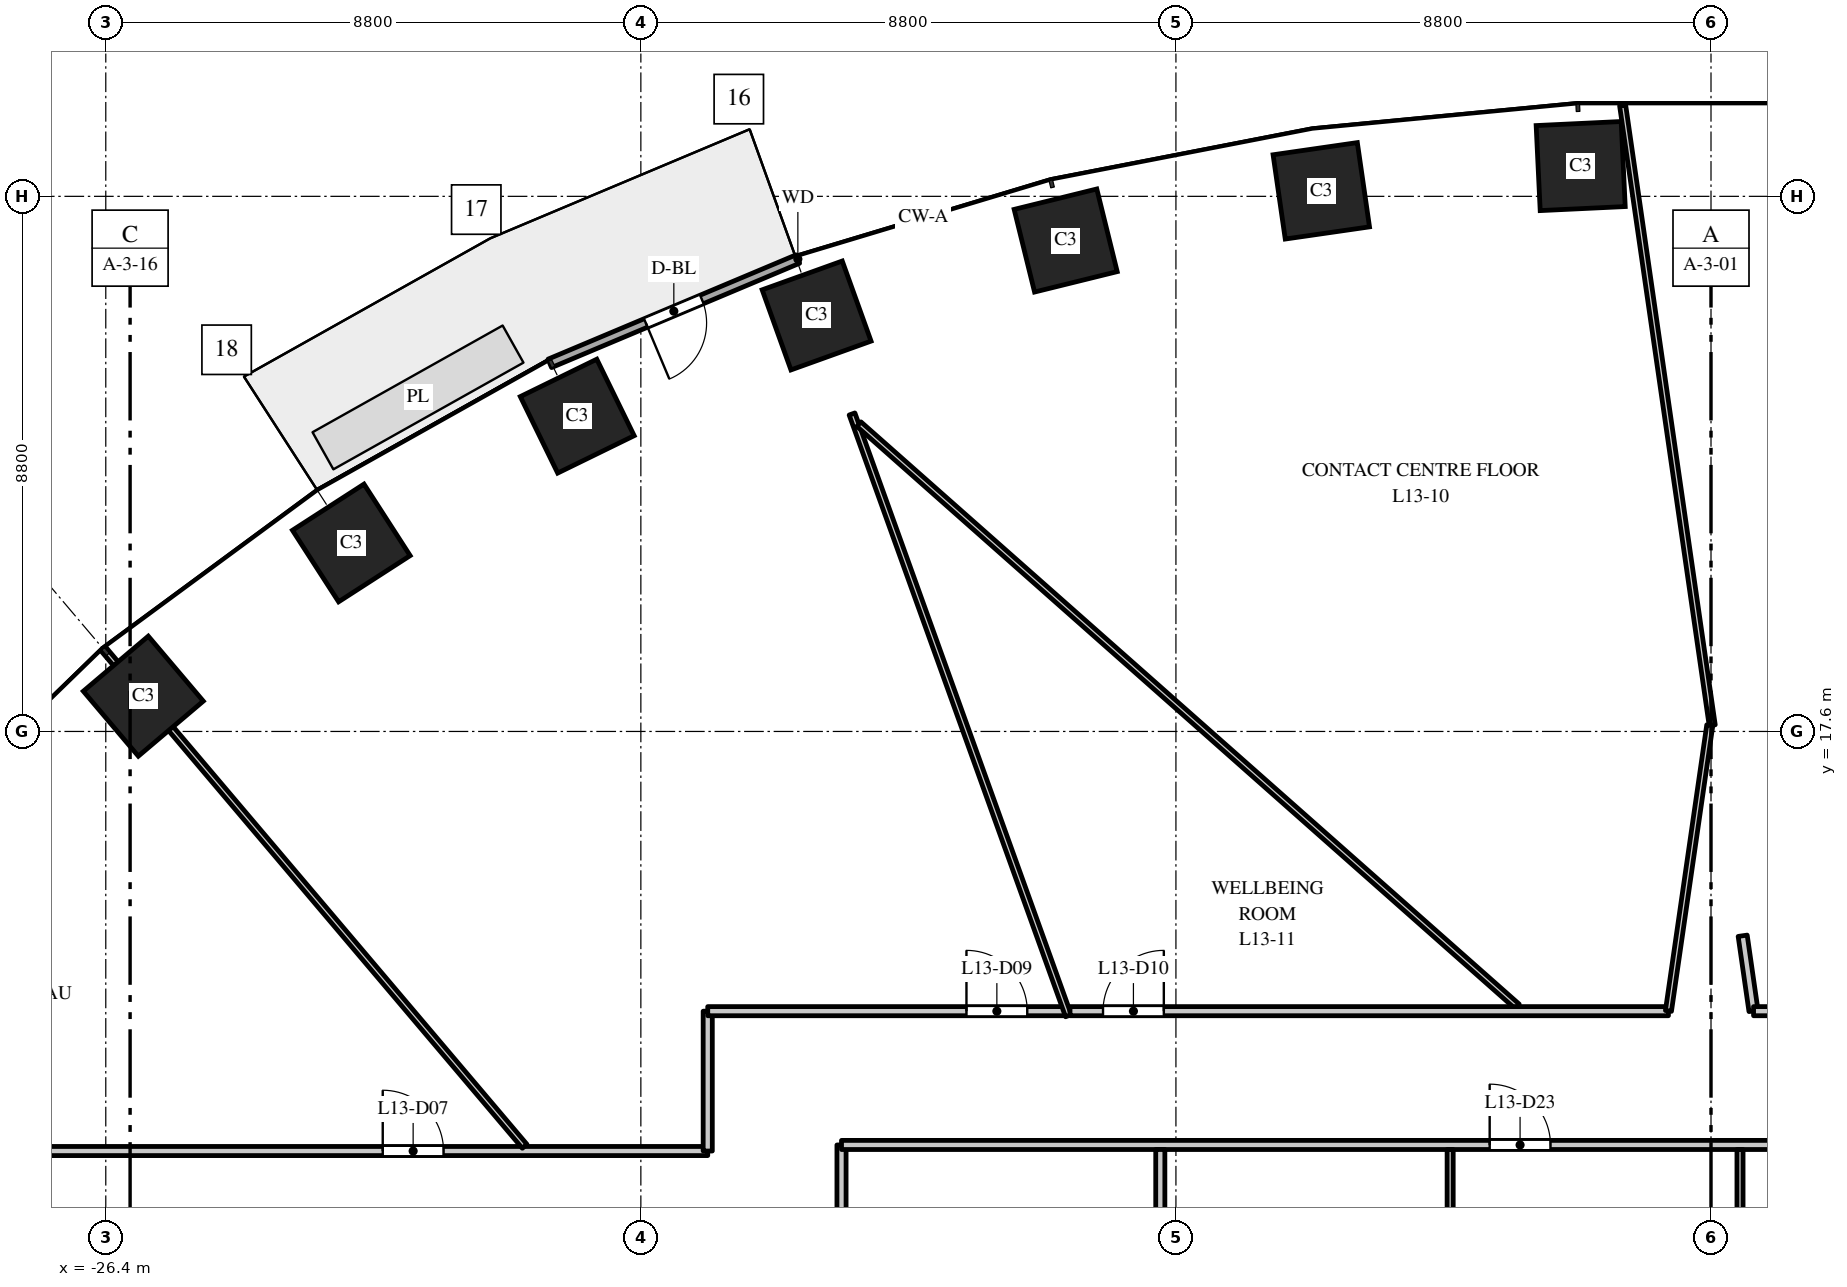
"""IFC4 building model, lengths in metres.
Left out: names, types, materials, properties, quantities, classifications, styles, units other than length and angle.
Written with IfcOpenShell. Run it as: python <this file> out.ifc"""

import sys

from ifc_helpers import new_model, si_unit, direction, frame, frame_2d, origin, origin_2d, place, context, subcontext, project, spatial, rectangle, extrude, element, fill, save


model = new_model("IFC4")
c1 = context("Model", 3, precision=1e-05, world=origin(), true_north=direction((0.0, 1.0)))
c2 = subcontext(c1, "Body", "Model", "MODEL_VIEW")
j1 = project(units=[si_unit("LENGTHUNIT", "METRE"), si_unit("PLANEANGLEUNIT", "RADIAN")], contexts=[c1])
p1 = place(None, origin())
s1 = spatial("IfcSite", under=j1, at=p1, CompositionType="ELEMENT")
p2 = place(p1, origin())
s2 = spatial("IfcBuilding", under=s1, at=p2, CompositionType="ELEMENT")
p3 = place(p2, frame((0.0, 0.0, 62.5)))
s3 = spatial("IfcBuildingStorey", under=s2, at=p3, CompositionType="ELEMENT", Elevation=62.5)
for number, where, z_axis, x_axis in (
    (1, (-2.143, 26.898, 0.0), (0.0, 0.0, 1.0), (-0.999, -0.048, 0.0)),
    (2, (-6.409, 26.491, 0.0), (0.0, 0.0, 1.0), (-0.99, -0.143, 0.0)),
    (3, (-10.613, 25.674, 0.0), (0.0, 0.0, 1.0), (-0.971, -0.24, 0.0)),
    (4, (-14.709, 24.441, 0.0), (0.0, 0.0, 1.0), (-0.941, -0.338, 0.0)),
    (5, (-18.646, 22.785, 0.0), (0.0, 0.0, 1.0), (-0.898, -0.439, 0.0)),
    (6, (-22.362, 20.7, 0.0), (0.0, 0.0, 1.0), (-0.84, -0.542, 0.0)),
    (7, (-25.783, 18.18, 0.0), (0.0, 0.0, 1.0), (-0.763, -0.646, 0.0)),
):
    element("IfcColumn", number, at=place(p3, frame(where, z_axis=z_axis, x_axis=x_axis)), inside=s3, PredefinedType="COLUMN", context=c2, shape_type="SweptSolid", body=[
        extrude(rectangle(XDim=1.4, YDim=1.4, at=origin_2d()), origin(), (0.0, 0.0, 1.0), 4.0),
    ])
p4 = place(p3, frame((-15.018, 25.369, 0.0), z_axis=(0.0, 0.0, 1.0), x_axis=(-0.921816985161, -0.387625393736, 0.0)))
e8 = element("IfcWall", 8, at=p4, inside=s3, PredefinedType="STANDARD", context=c2, shape_type="SweptSolid", body=[
    extrude(rectangle(XDim=4.426, YDim=0.15, at=frame_2d((2.213, 0.0))), origin(), (0.0, 0.0, 1.0), 3.7),
])
p5 = place(p4, frame((1.713, 0.0, 0.0)))
e9 = element("IfcOpeningElement", 9, at=p5, cuts=e8, PredefinedType="OPENING", context=c2, shape_type="SweptSolid", body=[
    extrude(rectangle(XDim=1.0, YDim=2.4, at=frame_2d((0.5, 1.2))), frame((0.0, 0.085, 0.0), z_axis=(0.0, -1.0, 0.0), x_axis=(1.0, 0.0, 0.0)), (0.0, 0.0, 1.0), 0.17),
])
p6 = place(p3, frame((-31.5, 10.7, 0.0), z_axis=(0.0, 0.0, 1.0), x_axis=(1.0, 0.0, 0.0)))
e10 = element("IfcWall", 10, at=p6, inside=s3, PredefinedType="PARTITIONING", context=c2, shape_type="SweptSolid", body=[
    extrude(rectangle(XDim=15.0, YDim=0.15, at=frame_2d((7.5, 0.0))), origin(), (0.0, 0.0, 1.0), 3.1),
])
p7 = place(p6, frame((9.655, 0.0, 0.0)))
e11 = element("IfcOpeningElement", 11, at=p7, cuts=e10, PredefinedType="OPENING", context=c2, shape_type="SweptSolid", body=[
    extrude(rectangle(XDim=1.0, YDim=2.1, at=frame_2d((0.5, 1.05))), frame((0.0, 0.085, 0.0), z_axis=(0.0, -1.0, 0.0), x_axis=(1.0, 0.0, 0.0)), (0.0, 0.0, 1.0), 0.17),
])
p8 = place(p3, frame((-26.43, 18.945, 0.0), z_axis=(0.0, 0.0, 1.0), x_axis=(0.646400187952, -0.762998556365, 0.0)))
e12 = element("IfcWall", 12, at=p8, inside=s3, PredefinedType="PARTITIONING", context=c2, shape_type="SweptSolid", body=[
    extrude(rectangle(XDim=10.704, YDim=0.1, at=frame_2d((5.352, 0.0))), origin(), (0.0, 0.0, 1.0), 3.7),
])
p9 = place(p3, frame((-16.5, 10.7, 0.0), z_axis=(0.0, 0.0, 1.0), x_axis=(0.0, 1.0, 0.0)))
e13 = element("IfcWall", 13, at=p9, inside=s3, PredefinedType="PARTITIONING", context=c2, shape_type="SweptSolid", body=[
    extrude(rectangle(XDim=2.3, YDim=0.15, at=frame_2d((1.15, 0.0))), origin(), (0.0, 0.0, 1.0), 2.75),
])
p10 = place(p3, frame((-16.5, 13.0, 0.0), z_axis=(0.0, 0.0, 1.0), x_axis=(1.0, 0.0, 0.0)))
e14 = element("IfcWall", 14, at=p10, inside=s3, PredefinedType="PARTITIONING", context=c2, shape_type="SweptSolid", body=[
    extrude(rectangle(XDim=5.893, YDim=0.15, at=frame_2d((2.947, 0.0))), origin(), (0.0, 0.0, 1.0), 2.85),
])
p11 = place(p10, frame((4.255, 0.0, 0.0)))
e15 = element("IfcOpeningElement", 15, at=p11, cuts=e14, PredefinedType="OPENING", context=c2, shape_type="SweptSolid", body=[
    extrude(rectangle(XDim=1.0, YDim=2.1, at=frame_2d((0.5, 1.05))), frame((0.0, 0.085, 0.0), z_axis=(0.0, -1.0, 0.0), x_axis=(1.0, 0.0, 0.0)), (0.0, 0.0, 1.0), 0.17),
])
p12 = place(p3, frame((-14.3, -10.8, 0.0), z_axis=(0.0, 0.0, 1.0), x_axis=(0.0, 1.0, 0.0)))
e16 = element("IfcWall", 16, at=p12, inside=s3, PredefinedType="PARTITIONING", context=c2, shape_type="SweptSolid", body=[
    extrude(rectangle(XDim=21.6, YDim=0.15, at=frame_2d((10.8, 0.0))), origin(), (0.0, 0.0, 1.0), 2.75),
])
p13 = place(p12, frame((0.65, 0.0, 0.0)))
e17 = element("IfcOpeningElement", 17, at=p13, cuts=e16, PredefinedType="OPENING", context=c2, shape_type="SweptSolid", body=[
    extrude(rectangle(XDim=1.0, YDim=2.1, at=frame_2d((0.5, 1.05))), frame((0.0, 0.085, 0.0), z_axis=(0.0, -1.0, 0.0), x_axis=(1.0, 0.0, 0.0)), (0.0, 0.0, 1.0), 0.17),
])
p14 = place(p3, frame((-14.3, 10.8, 0.0), z_axis=(0.0, 0.0, 1.0), x_axis=(1.0, 0.0, 0.0)))
e18 = element("IfcWall", 18, at=p14, inside=s3, PredefinedType="PARTITIONING", context=c2, shape_type="SweptSolid", body=[
    extrude(rectangle(XDim=28.6, YDim=0.15, at=frame_2d((14.3, 0.0))), origin(), (0.0, 0.0, 1.0), 2.85),
])
p15 = place(p14, frame((10.66, 0.0, 0.0)))
e19 = element("IfcOpeningElement", 19, at=p15, cuts=e18, PredefinedType="OPENING", context=c2, shape_type="SweptSolid", body=[
    extrude(rectangle(XDim=1.0, YDim=2.1, at=frame_2d((0.5, 1.05))), frame((0.0, 0.085, 0.0), z_axis=(0.0, -1.0, 0.0), x_axis=(1.0, 0.0, 0.0)), (0.0, 0.0, 1.0), 0.17),
])
p16 = place(p14, frame((15.427, 0.0, 0.0)))
e20 = element("IfcOpeningElement", 20, at=p16, cuts=e18, PredefinedType="OPENING", context=c2, shape_type="SweptSolid", body=[
    extrude(rectangle(XDim=1.0, YDim=2.1, at=frame_2d((0.5, 1.05))), frame((0.0, 0.085, 0.0), z_axis=(0.0, -1.0, 0.0), x_axis=(1.0, 0.0, 0.0)), (0.0, 0.0, 1.0), 0.17),
])
p17 = place(p14, frame((22.693, 0.0, 0.0)))
e21 = element("IfcOpeningElement", 21, at=p17, cuts=e18, PredefinedType="OPENING", context=c2, shape_type="SweptSolid", body=[
    extrude(rectangle(XDim=1.0, YDim=2.1, at=frame_2d((0.5, 1.05))), frame((0.0, 0.085, 0.0), z_axis=(0.0, -1.0, 0.0), x_axis=(1.0, 0.0, 0.0)), (0.0, 0.0, 1.0), 0.17),
])
p18 = place(p3, frame((-14.127, 22.821, 0.0), z_axis=(0.0, 0.0, 1.0), x_axis=(0.338406243201, -0.941000114008, 0.0)))
e22 = element("IfcWall", 22, at=p18, inside=s3, PredefinedType="PARTITIONING", context=c2, shape_type="SweptSolid", body=[
    extrude(rectangle(XDim=10.516, YDim=0.1, at=frame_2d((5.258, 0.0))), origin(), (0.0, 0.0, 1.0), 2.85),
])
p19 = place(p3, frame((-14.014, 22.654, 0.0), z_axis=(0.0, 0.0, 1.0), x_axis=(0.749047176019, -0.662516662506, 0.0)))
e23 = element("IfcWall", 23, at=p19, inside=s3, PredefinedType="PARTITIONING", context=c2, shape_type="SweptSolid", body=[
    extrude(rectangle(XDim=14.454, YDim=0.1, at=frame_2d((7.227, 0.0))), origin(), (0.0, 0.0, 1.0), 2.85),
])
p20 = place(p3, frame((-10.542, 13.0, 0.0), z_axis=(0.0, 0.0, 1.0), x_axis=(1.0, 0.0, 0.0)))
e24 = element("IfcWall", 24, at=p20, inside=s3, PredefinedType="PARTITIONING", context=c2, shape_type="SweptSolid", body=[
    extrude(rectangle(XDim=9.842, YDim=0.15, at=frame_2d((4.921, 0.0))), origin(), (0.0, 0.0, 1.0), 2.85),
])
p21 = place(p20, frame((0.543, 0.0, 0.0)))
e25 = element("IfcOpeningElement", 25, at=p21, cuts=e24, PredefinedType="OPENING", context=c2, shape_type="SweptSolid", body=[
    extrude(rectangle(XDim=1.0, YDim=2.1, at=frame_2d((0.5, 1.05))), frame((0.0, 0.085, 0.0), z_axis=(0.0, -1.0, 0.0), x_axis=(1.0, 0.0, 0.0)), (0.0, 0.0, 1.0), 0.17),
])
p22 = place(p3, frame((-9.057, 0.045, 0.0), z_axis=(0.0, 0.0, 1.0), x_axis=(0.0, 1.0, 0.0)))
e26 = element("IfcWall", 26, at=p22, inside=s3, PredefinedType="PARTITIONING", context=c2, shape_type="SweptSolid", body=[
    extrude(rectangle(XDim=10.68, YDim=0.15, at=frame_2d((5.34, 0.0))), origin(), (0.0, 0.0, 1.0), 2.75),
])
p23 = place(p22, frame((4.61, 0.0, 0.0)))
e27 = element("IfcOpeningElement", 27, at=p23, cuts=e26, PredefinedType="OPENING", context=c2, shape_type="SweptSolid", body=[
    extrude(rectangle(XDim=1.0, YDim=2.1, at=frame_2d((0.5, 1.05))), frame((0.0, 0.085, 0.0), z_axis=(0.0, -1.0, 0.0), x_axis=(1.0, 0.0, 0.0)), (0.0, 0.0, 1.0), 0.17),
])
p24 = place(p3, frame((-4.29, 6.568, 0.0), z_axis=(0.0, 0.0, 1.0), x_axis=(0.0, 1.0, 0.0)))
e28 = element("IfcWall", 28, at=p24, inside=s3, PredefinedType="PARTITIONING", context=c2, shape_type="SweptSolid", body=[
    extrude(rectangle(XDim=4.157, YDim=0.1, at=frame_2d((2.079, 0.0))), origin(), (0.0, 0.0, 1.0), 2.85),
])
p25 = place(p3, frame((-1.453, 27.894, 0.0), z_axis=(0.0, 0.0, 1.0), x_axis=(0.143027592995, -0.989718701269, 0.0)))
e29 = element("IfcWall", 29, at=p25, inside=s3, PredefinedType="PARTITIONING", context=c2, shape_type="SweptSolid", body=[
    extrude(rectangle(XDim=10.298, YDim=0.1, at=frame_2d((5.149, 0.0))), origin(), (0.0, 0.0, 1.0), 2.85),
])
p26 = place(p3, frame((-0.7, 13.004, 0.0), z_axis=(0.0, 0.0, 1.0), x_axis=(0.143235607816, 0.989688618028, 0.0)))
e30 = element("IfcWall", 30, at=p26, inside=s3, PredefinedType="PARTITIONING", context=c2, shape_type="SweptSolid", body=[
    extrude(rectangle(XDim=4.747, YDim=0.1, at=frame_2d((2.374, 0.0))), origin(), (0.0, 0.0, 1.0), 3.7),
])
p27 = place(p3, frame((0.477, 7.468, 0.0), z_axis=(0.0, 0.0, 1.0), x_axis=(0.0, 1.0, 0.0)))
e31 = element("IfcWall", 31, at=p27, inside=s3, PredefinedType="PARTITIONING", context=c2, shape_type="SweptSolid", body=[
    extrude(rectangle(XDim=3.257, YDim=0.1, at=frame_2d((1.628, 0.0))), origin(), (0.0, 0.0, 1.0), 2.85),
])
p28 = place(p3, frame((0.521, 14.24, 0.0), z_axis=(0.0, 0.0, 1.0), x_axis=(0.142516043205, -0.989792492106, 0.0)))
e32 = element("IfcWall", 32, at=p28, inside=s3, PredefinedType="PARTITIONING", context=c2, shape_type="SweptSolid", body=[
    extrude(rectangle(XDim=1.249, YDim=0.15, at=frame_2d((0.625, 0.0))), origin(), (0.0, 0.0, 1.0), 3.7),
])
p29 = place(p3, frame((0.7, 13.0, 0.0), z_axis=(0.0, 0.0, 1.0), x_axis=(1.0, 0.0, 0.0)))
e33 = element("IfcWall", 33, at=p29, inside=s3, PredefinedType="PARTITIONING", context=c2, shape_type="SweptSolid", body=[
    extrude(rectangle(XDim=6.783, YDim=0.15, at=frame_2d((3.392, 0.0))), origin(), (0.0, 0.0, 1.0), 2.85),
])
p30 = place(p29, frame((0.754, 0.0, 0.0)))
e34 = element("IfcOpeningElement", 34, at=p30, cuts=e33, PredefinedType="OPENING", context=c2, shape_type="SweptSolid", body=[
    extrude(rectangle(XDim=1.0, YDim=2.1, at=frame_2d((0.5, 1.05))), frame((0.0, 0.085, 0.0), z_axis=(0.0, -1.0, 0.0), x_axis=(1.0, 0.0, 0.0)), (0.0, 0.0, 1.0), 0.17),
])
p31 = place(p29, frame((4.149, 0.0, 0.0)))
e35 = element("IfcOpeningElement", 35, at=p31, cuts=e33, PredefinedType="OPENING", context=c2, shape_type="SweptSolid", body=[
    extrude(rectangle(XDim=1.0, YDim=2.1, at=frame_2d((0.5, 1.05))), frame((0.0, 0.085, 0.0), z_axis=(0.0, -1.0, 0.0), x_axis=(1.0, 0.0, 0.0)), (0.0, 0.0, 1.0), 0.17),
])
p32 = place(p5, origin())
e36 = element("IfcDoor", 36, at=p32, inside=s3, OperationType="SINGLE_SWING_RIGHT", PredefinedType="DOOR", context=c2, shape_type="SweptSolid", body=[
    extrude(rectangle(XDim=1.0, YDim=2.4, at=frame_2d((0.5, 1.2))), frame((0.0, 0.025, 0.0), z_axis=(0.0, -1.0, 0.0), x_axis=(1.0, 0.0, 0.0)), (0.0, 0.0, 1.0), 0.05),
])
fill(e9, e36)
p33 = place(p7, origin())
e37 = element("IfcDoor", 37, at=p33, inside=s3, OperationType="SINGLE_SWING_LEFT", PredefinedType="DOOR", context=c2, shape_type="SweptSolid", body=[
    extrude(rectangle(XDim=1.0, YDim=2.1, at=frame_2d((0.5, 1.05))), frame((0.0, 0.025, 0.0), z_axis=(0.0, -1.0, 0.0), x_axis=(1.0, 0.0, 0.0)), (0.0, 0.0, 1.0), 0.05),
])
fill(e11, e37)
p34 = place(p11, origin())
e38 = element("IfcDoor", 38, at=p34, inside=s3, OperationType="SINGLE_SWING_LEFT", PredefinedType="DOOR", context=c2, shape_type="SweptSolid", body=[
    extrude(rectangle(XDim=1.0, YDim=2.1, at=frame_2d((0.5, 1.05))), frame((0.0, 0.025, 0.0), z_axis=(0.0, -1.0, 0.0), x_axis=(1.0, 0.0, 0.0)), (0.0, 0.0, 1.0), 0.05),
])
fill(e15, e38)
p35 = place(p21, origin())
e39 = element("IfcDoor", 39, at=p35, inside=s3, OperationType="SINGLE_SWING_RIGHT", PredefinedType="DOOR", context=c2, shape_type="SweptSolid", body=[
    extrude(rectangle(XDim=1.0, YDim=2.1, at=frame_2d((0.5, 1.05))), frame((0.0, 0.025, 0.0), z_axis=(0.0, -1.0, 0.0), x_axis=(1.0, 0.0, 0.0)), (0.0, 0.0, 1.0), 0.05),
])
fill(e25, e39)
p36 = place(p15, origin())
e40 = element("IfcDoor", 40, at=p36, inside=s3, OperationType="SINGLE_SWING_LEFT", PredefinedType="DOOR", context=c2, shape_type="SweptSolid", body=[
    extrude(rectangle(XDim=1.0, YDim=2.1, at=frame_2d((0.5, 1.05))), frame((0.0, 0.025, 0.0), z_axis=(0.0, -1.0, 0.0), x_axis=(1.0, 0.0, 0.0)), (0.0, 0.0, 1.0), 0.05),
])
fill(e19, e40)
save(model, sys.argv[1])
